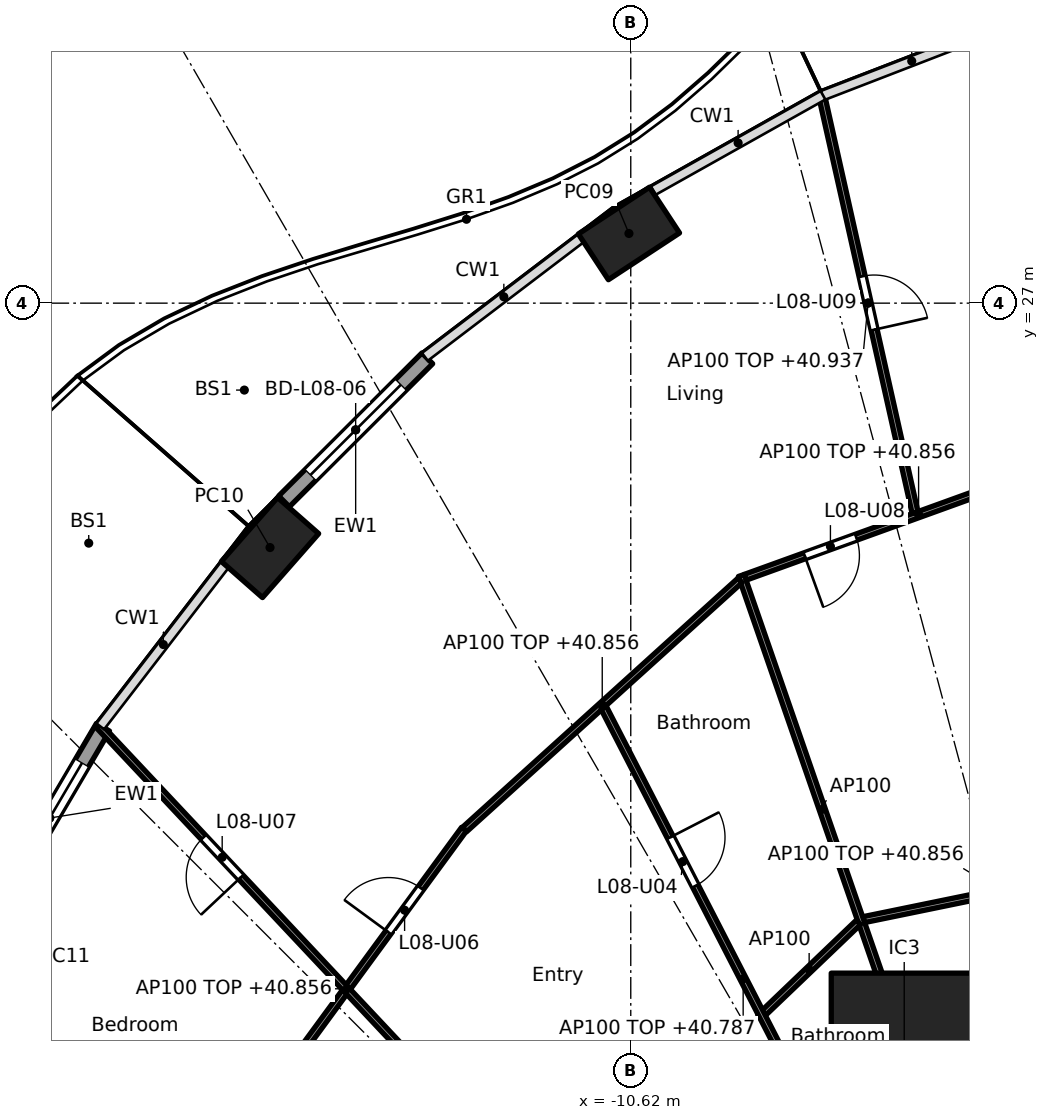
"""IFC4 building model, lengths in metres.
Left out: names, types, materials, properties, quantities, classifications, styles, units other than length and angle.
Written with IfcOpenShell. Run it as: python <this file> out.ifc"""

import sys

from ifc_helpers import new_model, si_unit, direction, frame, frame_2d, origin, origin_2d, place, context, subcontext, project, spatial, rectangle, hollow_rectangle, extrude, element, fill, save


model = new_model("IFC4")
c1 = context("Model", 3, precision=1e-05, world=origin(), true_north=direction((0.0, 1.0)))
c2 = subcontext(c1, "Body", "Model", "MODEL_VIEW")
j1 = project(units=[si_unit("LENGTHUNIT", "METRE"), si_unit("PLANEANGLEUNIT", "RADIAN")], contexts=[c1])
p1 = place(None, origin())
s1 = spatial("IfcSite", under=j1, at=p1, CompositionType="ELEMENT")
p2 = place(p1, origin())
s2 = spatial("IfcBuilding", under=s1, at=p2, CompositionType="ELEMENT")
p3 = place(p2, frame((0.0, 0.0, 38.1)))
s3 = spatial("IfcBuildingStorey", under=s2, at=p3, CompositionType="ELEMENT", Elevation=38.1)
for number, where, z_axis, x_axis in (
    (1, (-10.65, 28.146, 0.0), (0.0, 0.0, 1.0), (-0.836, -0.549, 0.0)),
    (2, (-16.552, 22.981, 0.0), (0.0, 0.0, 1.0), (-0.66, -0.751, 0.0)),
):
    element("IfcColumn", number, at=place(p3, frame(where, z_axis=z_axis, x_axis=x_axis)), inside=s3, PredefinedType="COLUMN", context=c2, shape_type="SweptSolid", body=[
        extrude(hollow_rectangle(XDim=1.4, YDim=0.9, WallThickness=0.05, at=origin_2d()), origin(), (0.0, 0.0, 1.0), 3.7),
    ])
p4 = place(p3, frame((-6.123, 14.782, 0.0), z_axis=(0.0, 0.0, 1.0), x_axis=(1.0, 0.0, 0.0)))
e3 = element("IfcColumn", 3, at=p4, inside=s3, PredefinedType="COLUMN", context=c2, shape_type="SweptSolid", body=[
    extrude(rectangle(XDim=2.4, YDim=2.4, at=origin_2d()), origin(), (0.0, 0.0, 1.0), 3.7),
])
p5 = place(p3, frame((-16.322, 23.74, 0.0), z_axis=(0.0, 0.0, 1.0), x_axis=(0.707803094595, 0.706409781417, 0.0)))
e4 = element("IfcWall", 4, at=p5, inside=s3, PredefinedType="SOLIDWALL", context=c2, shape_type="SweptSolid", body=[
    extrude(rectangle(XDim=3.329, YDim=0.25, at=frame_2d((1.665, 0.0))), origin(), (0.0, 0.0, 1.0), 3.44),
])
p6 = place(p5, frame((0.615, 0.0, 0.0)))
e5 = element("IfcOpeningElement", 5, at=p6, cuts=e4, PredefinedType="OPENING", context=c2, shape_type="SweptSolid", body=[
    extrude(rectangle(XDim=2.1, YDim=2.4, at=frame_2d((1.05, 1.2))), frame((0.0, 0.135, 0.0), z_axis=(0.0, -1.0, 0.0), x_axis=(1.0, 0.0, 0.0)), (0.0, 0.0, 1.0), 0.27),
])
p7 = place(p3, frame((-21.052, 17.04, 0.0), z_axis=(0.0, 0.0, 1.0), x_axis=(0.506311160839, 0.862350861546, 0.0)))
e6 = element("IfcWall", 6, at=p7, inside=s3, PredefinedType="SOLIDWALL", context=c2, shape_type="SweptSolid", body=[
    extrude(rectangle(XDim=3.462, YDim=0.25, at=frame_2d((1.731, 0.0))), origin(), (0.0, 0.0, 1.0), 3.44),
])
p8 = place(p7, frame((0.681, 0.0, 0.0)))
e7 = element("IfcOpeningElement", 7, at=p8, cuts=e6, PredefinedType="OPENING", context=c2, shape_type="SweptSolid", body=[
    extrude(rectangle(XDim=2.1, YDim=2.4, at=frame_2d((1.05, 1.2))), frame((0.0, 0.135, 0.0), z_axis=(0.0, -1.0, 0.0), x_axis=(1.0, 0.0, 0.0)), (0.0, 0.0, 1.0), 0.27),
])
p9 = place(p3, frame((-2.272, 17.789, 0.0), z_axis=(0.0, 0.0, 1.0), x_axis=(-0.979587203416, -0.2010196779, 0.0)))
e8 = element("IfcWall", 8, at=p9, inside=s3, PredefinedType="PARTITIONING", context=c2, shape_type="SweptSolid", body=[
    extrude(rectangle(XDim=4.613, YDim=0.1, at=frame_2d((2.306, 0.0))), origin(), (0.0, 0.0, 1.0), 2.756),
])
p10 = place(p9, frame((1.881, 0.0, 0.0)))
e9 = element("IfcOpeningElement", 9, at=p10, cuts=e8, PredefinedType="OPENING", context=c2, shape_type="SweptSolid", body=[
    extrude(rectangle(XDim=0.9, YDim=2.1, at=frame_2d((0.45, 1.05))), frame((0.0, 0.06, 0.0), z_axis=(0.0, -1.0, 0.0), x_axis=(1.0, 0.0, 0.0)), (0.0, 0.0, 1.0), 0.12),
])
p11 = place(p3, frame((-3.034, 24.554, 0.0), z_axis=(0.0, 0.0, 1.0), x_axis=(-0.940401691072, -0.340065669288, 0.0)))
e10 = element("IfcWall", 10, at=p11, inside=s3, PredefinedType="PARTITIONING", context=c2, shape_type="SweptSolid", body=[
    extrude(rectangle(XDim=6.067, YDim=0.1, at=frame_2d((3.034, 0.0))), origin(), (0.0, 0.0, 1.0), 2.756),
])
p12 = place(p11, frame((4.125, 0.0, 0.0)))
e11 = element("IfcOpeningElement", 11, at=p12, cuts=e10, PredefinedType="OPENING", context=c2, shape_type="SweptSolid", body=[
    extrude(rectangle(XDim=0.9, YDim=2.1, at=frame_2d((0.45, 1.05))), frame((0.0, 0.06, 0.0), z_axis=(0.0, -1.0, 0.0), x_axis=(1.0, 0.0, 0.0)), (0.0, 0.0, 1.0), 0.12),
])
p13 = place(p3, frame((-5.945, 23.555, 0.0), z_axis=(0.0, 0.0, 1.0), x_axis=(-0.218598565433, 0.975814873421, 0.0)))
e12 = element("IfcWall", 12, at=p13, inside=s3, PredefinedType="PARTITIONING", context=c2, shape_type="SweptSolid", body=[
    extrude(rectangle(XDim=7.065, YDim=0.1, at=frame_2d((3.533, 0.0))), origin(), (0.0, 0.0, 1.0), 2.837),
])
p14 = place(p13, frame((3.083, 0.0, 0.0)))
e13 = element("IfcOpeningElement", 13, at=p14, cuts=e12, PredefinedType="OPENING", context=c2, shape_type="SweptSolid", body=[
    extrude(rectangle(XDim=0.9, YDim=2.1, at=frame_2d((0.45, 1.05))), frame((0.0, 0.06, 0.0), z_axis=(0.0, -1.0, 0.0), x_axis=(1.0, 0.0, 0.0)), (0.0, 0.0, 1.0), 0.12),
])
p15 = place(p3, frame((-6.139, 14.829, 0.0), z_axis=(0.0, 0.0, 1.0), x_axis=(-0.327183700812, 0.944960753642, 0.0)))
e14 = element("IfcWall", 14, at=p15, inside=s3, PredefinedType="PARTITIONING", context=c2, shape_type="SweptSolid", body=[
    extrude(rectangle(XDim=8.14, YDim=0.1, at=frame_2d((4.07, 0.0))), origin(), (0.0, 0.0, 1.0), 3.44),
])
p16 = place(p3, frame((-6.876, 16.817, 0.0), z_axis=(0.0, 0.0, 1.0), x_axis=(-0.722762371977, -0.691096631199, 0.0)))
e15 = element("IfcWall", 15, at=p16, inside=s3, PredefinedType="PARTITIONING", context=c2, shape_type="SweptSolid", body=[
    extrude(rectangle(XDim=2.244, YDim=0.1, at=frame_2d((1.122, 0.0))), origin(), (0.0, 0.0, 1.0), 3.44),
])
p17 = place(p3, frame((-8.823, 22.441, 0.0), z_axis=(0.0, 0.0, 1.0), x_axis=(-0.741722263338, -0.670707152242, 0.0)))
e16 = element("IfcWall", 16, at=p17, inside=s3, PredefinedType="PARTITIONING", context=c2, shape_type="SweptSolid", body=[
    extrude(rectangle(XDim=6.109, YDim=0.1, at=frame_2d((3.055, 0.0))), origin(), (0.0, 0.0, 1.0), 2.756),
])
p18 = place(p3, frame((-6.477, 11.427, 0.0), z_axis=(0.0, 0.0, 1.0), x_axis=(-0.457464037982, 0.889228122561, 0.0)))
e17 = element("IfcWall", 17, at=p18, inside=s3, PredefinedType="PARTITIONING", context=c2, shape_type="SweptSolid", body=[
    extrude(rectangle(XDim=10.032, YDim=0.1, at=frame_2d((5.016, 0.0))), origin(), (0.0, 0.0, 1.0), 2.687),
])
p19 = place(p18, frame((0.35, 0.0, 0.0)))
e18 = element("IfcOpeningElement", 18, at=p19, cuts=e17, PredefinedType="OPENING", context=c2, shape_type="SweptSolid", body=[
    extrude(rectangle(XDim=0.9, YDim=2.1, at=frame_2d((0.45, 1.05))), frame((0.0, 0.06, 0.0), z_axis=(0.0, -1.0, 0.0), x_axis=(1.0, 0.0, 0.0)), (0.0, 0.0, 1.0), 0.12),
])
p20 = place(p18, frame((6.735, 0.0, 0.0)))
e19 = element("IfcOpeningElement", 19, at=p20, cuts=e17, PredefinedType="OPENING", context=c2, shape_type="SweptSolid", body=[
    extrude(rectangle(XDim=0.9, YDim=2.1, at=frame_2d((0.45, 1.05))), frame((0.0, 0.06, 0.0), z_axis=(0.0, -1.0, 0.0), x_axis=(1.0, 0.0, 0.0)), (0.0, 0.0, 1.0), 0.12),
])
p21 = place(p3, frame((-13.362, 18.35, 0.0), z_axis=(0.0, 0.0, 1.0), x_axis=(-0.591191311491, -0.806531359104, 0.0)))
e20 = element("IfcWall", 20, at=p21, inside=s3, PredefinedType="PARTITIONING", context=c2, shape_type="SweptSolid", body=[
    extrude(rectangle(XDim=6.51, YDim=0.1, at=frame_2d((3.255, 0.0))), origin(), (0.0, 0.0, 1.0), 2.756),
])
p22 = place(p21, frame((1.202, 0.0, 0.0)))
e21 = element("IfcOpeningElement", 21, at=p22, cuts=e20, PredefinedType="OPENING", context=c2, shape_type="SweptSolid", body=[
    extrude(rectangle(XDim=0.9, YDim=2.1, at=frame_2d((0.45, 1.05))), frame((0.0, 0.06, 0.0), z_axis=(0.0, -1.0, 0.0), x_axis=(1.0, 0.0, 0.0)), (0.0, 0.0, 1.0), 0.12),
])
p23 = place(p3, frame((-8.953, 8.958, 0.0), z_axis=(0.0, 0.0, 1.0), x_axis=(-0.684574307023, 0.728943082939, 0.0)))
e22 = element("IfcWall", 22, at=p23, inside=s3, PredefinedType="PARTITIONING", context=c2, shape_type="SweptSolid", body=[
    extrude(rectangle(XDim=15.231, YDim=0.1, at=frame_2d((7.615, 0.0))), origin(), (0.0, 0.0, 1.0), 2.687),
])
p24 = place(p23, frame((1.54, 0.0, 0.0)))
e23 = element("IfcOpeningElement", 23, at=p24, cuts=e22, PredefinedType="OPENING", context=c2, shape_type="SweptSolid", body=[
    extrude(rectangle(XDim=0.9, YDim=2.1, at=frame_2d((0.45, 1.05))), frame((0.0, 0.06, 0.0), z_axis=(0.0, -1.0, 0.0), x_axis=(1.0, 0.0, 0.0)), (0.0, 0.0, 1.0), 0.12),
])
p25 = place(p23, frame((6.174, 0.0, 0.0)))
e24 = element("IfcOpeningElement", 24, at=p25, cuts=e22, PredefinedType="OPENING", context=c2, shape_type="SweptSolid", body=[
    extrude(rectangle(XDim=0.9, YDim=2.1, at=frame_2d((0.45, 1.05))), frame((0.0, 0.06, 0.0), z_axis=(0.0, -1.0, 0.0), x_axis=(1.0, 0.0, 0.0)), (0.0, 0.0, 1.0), 0.12),
])
p26 = place(p23, frame((11.8, 0.0, 0.0)))
e25 = element("IfcOpeningElement", 25, at=p26, cuts=e22, PredefinedType="OPENING", context=c2, shape_type="SweptSolid", body=[
    extrude(rectangle(XDim=0.9, YDim=2.1, at=frame_2d((0.45, 1.05))), frame((0.0, 0.06, 0.0), z_axis=(0.0, -1.0, 0.0), x_axis=(1.0, 0.0, 0.0)), (0.0, 0.0, 1.0), 0.12),
])
p27 = place(p6, origin())
e26 = element("IfcDoor", 26, at=p27, inside=s3, OperationType="SLIDING_TO_LEFT", PredefinedType="DOOR", context=c2, shape_type="SweptSolid", body=[
    extrude(rectangle(XDim=2.1, YDim=2.4, at=frame_2d((1.05, 1.2))), frame((0.0, 0.025, 0.0), z_axis=(0.0, -1.0, 0.0), x_axis=(1.0, 0.0, 0.0)), (0.0, 0.0, 1.0), 0.05),
])
fill(e5, e26)
p28 = place(p8, origin())
e27 = element("IfcDoor", 27, at=p28, inside=s3, OperationType="SLIDING_TO_LEFT", PredefinedType="DOOR", context=c2, shape_type="SweptSolid", body=[
    extrude(rectangle(XDim=2.1, YDim=2.4, at=frame_2d((1.05, 1.2))), frame((0.0, 0.025, 0.0), z_axis=(0.0, -1.0, 0.0), x_axis=(1.0, 0.0, 0.0)), (0.0, 0.0, 1.0), 0.05),
])
fill(e7, e27)
p29 = place(p20, frame((0.9, 0.0, 0.0), x_axis=(-1.0, 0.0, 0.0)))
e28 = element("IfcDoor", 28, at=p29, inside=s3, OperationType="SINGLE_SWING_LEFT", PredefinedType="DOOR", context=c2, shape_type="SweptSolid", body=[
    extrude(rectangle(XDim=0.9, YDim=2.1, at=frame_2d((0.45, 1.05))), frame((0.0, 0.025, 0.0), z_axis=(0.0, -1.0, 0.0), x_axis=(1.0, 0.0, 0.0)), (0.0, 0.0, 1.0), 0.05),
])
fill(e19, e28)
p30 = place(p22, frame((0.9, 0.0, 0.0), x_axis=(-1.0, 0.0, 0.0)))
e29 = element("IfcDoor", 29, at=p30, inside=s3, OperationType="SINGLE_SWING_LEFT", PredefinedType="DOOR", context=c2, shape_type="SweptSolid", body=[
    extrude(rectangle(XDim=0.9, YDim=2.1, at=frame_2d((0.45, 1.05))), frame((0.0, 0.025, 0.0), z_axis=(0.0, -1.0, 0.0), x_axis=(1.0, 0.0, 0.0)), (0.0, 0.0, 1.0), 0.05),
])
fill(e21, e29)
p31 = place(p26, origin())
e30 = element("IfcDoor", 30, at=p31, inside=s3, OperationType="SINGLE_SWING_LEFT", PredefinedType="DOOR", context=c2, shape_type="SweptSolid", body=[
    extrude(rectangle(XDim=0.9, YDim=2.1, at=frame_2d((0.45, 1.05))), frame((0.0, 0.025, 0.0), z_axis=(0.0, -1.0, 0.0), x_axis=(1.0, 0.0, 0.0)), (0.0, 0.0, 1.0), 0.05),
])
fill(e25, e30)
p32 = place(p12, origin())
e31 = element("IfcDoor", 31, at=p32, inside=s3, OperationType="SINGLE_SWING_RIGHT", PredefinedType="DOOR", context=c2, shape_type="SweptSolid", body=[
    extrude(rectangle(XDim=0.9, YDim=2.1, at=frame_2d((0.45, 1.05))), frame((0.0, 0.025, 0.0), z_axis=(0.0, -1.0, 0.0), x_axis=(1.0, 0.0, 0.0)), (0.0, 0.0, 1.0), 0.05),
])
fill(e11, e31)
p33 = place(p14, frame((0.9, 0.0, 0.0), x_axis=(-1.0, 0.0, 0.0)))
e32 = element("IfcDoor", 32, at=p33, inside=s3, OperationType="SINGLE_SWING_RIGHT", PredefinedType="DOOR", context=c2, shape_type="SweptSolid", body=[
    extrude(rectangle(XDim=0.9, YDim=2.1, at=frame_2d((0.45, 1.05))), frame((0.0, 0.025, 0.0), z_axis=(0.0, -1.0, 0.0), x_axis=(1.0, 0.0, 0.0)), (0.0, 0.0, 1.0), 0.05),
])
fill(e13, e32)
save(model, sys.argv[1])
